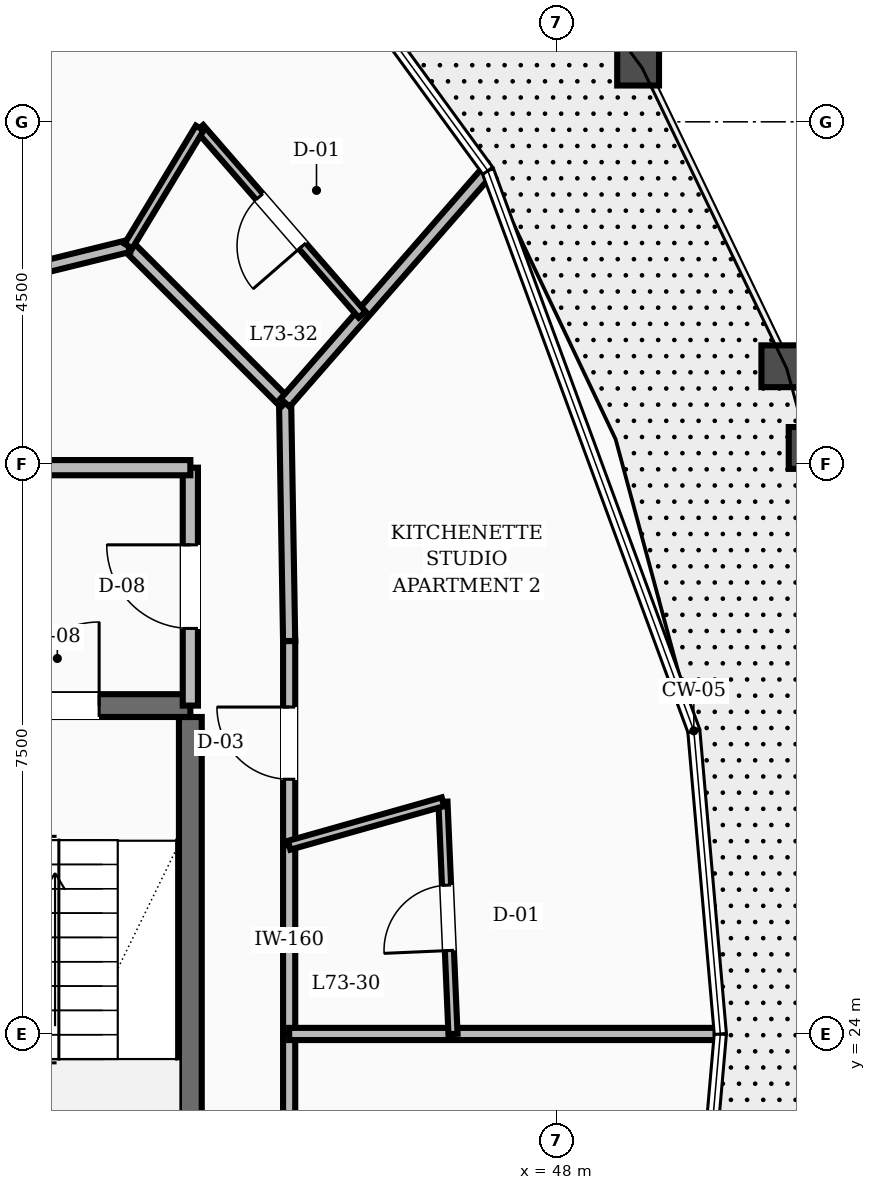
"""IFC4 building model, lengths in metres.
Left out: names, types, materials, properties, quantities, classifications, styles, units other than length and angle.
Written with IfcOpenShell. Run it as: python <this file> out.ifc"""

import sys

from ifc_helpers import new_model, si_unit, direction, frame, frame_2d, origin, place, context, subcontext, project, spatial, rectangle, extrude, element, fill, save


model = new_model("IFC4")
c1 = context("Model", 3, precision=1e-05, world=origin(), true_north=direction((0.0, 1.0)))
c2 = subcontext(c1, "Body", "Model", "MODEL_VIEW")
j1 = project(units=[si_unit("LENGTHUNIT", "METRE"), si_unit("PLANEANGLEUNIT", "RADIAN")], contexts=[c1])
p1 = place(None, origin())
s1 = spatial("IfcSite", under=j1, at=p1, CompositionType="ELEMENT")
p2 = place(p1, origin())
s2 = spatial("IfcBuilding", under=s1, at=p2, CompositionType="ELEMENT")
p3 = place(p2, frame((0.0, 0.0, 279.6)))
s3 = spatial("IfcBuildingStorey", under=s2, at=p3, CompositionType="ELEMENT", Elevation=279.6)
p4 = place(p3, frame((43.18, 19.43, 0.0), z_axis=(0.0, 0.0, 1.0), x_axis=(0.0, 1.0, 0.0)))
e1 = element("IfcWall", 1, at=p4, inside=s3, PredefinedType="SHEAR", context=c2, shape_type="SweptSolid", body=[
    extrude(rectangle(XDim=8.74, YDim=0.3, at=frame_2d((4.37, 0.0))), origin(), (0.0, 0.0, 1.0), 3.6),
])
p5 = place(p3, frame((39.58, 28.32, 0.0), z_axis=(0.0, 0.0, 1.0), x_axis=(1.0, 0.0, 0.0)))
e2 = element("IfcWall", 2, at=p5, inside=s3, PredefinedType="SHEAR", context=c2, shape_type="SweptSolid", body=[
    extrude(rectangle(XDim=3.6, YDim=0.3, at=frame_2d((1.8, 0.0))), origin(), (0.0, 0.0, 1.0), 3.6),
])
p6 = place(p5, frame((1.3, 0.0, 0.0)))
e3 = element("IfcOpeningElement", 3, at=p6, cuts=e2, PredefinedType="OPENING", context=c2, shape_type="SweptSolid", body=[
    extrude(rectangle(XDim=1.1, YDim=2.1, at=frame_2d((0.55, 1.05))), frame((0.0, 0.16, 0.0), z_axis=(0.0, -1.0, 0.0), x_axis=(1.0, 0.0, 0.0)), (0.0, 0.0, 1.0), 0.32),
])
p7 = place(p3, frame((43.18, 28.32, 0.0), z_axis=(0.0, 0.0, 1.0), x_axis=(0.0, 1.0, 0.0)))
e4 = element("IfcWall", 4, at=p7, inside=s3, PredefinedType="SOLIDWALL", context=c2, shape_type="SweptSolid", body=[
    extrude(rectangle(XDim=3.13, YDim=0.2, at=frame_2d((1.565, 0.0))), origin(), (0.0, 0.0, 1.0), 2.87),
])
p8 = place(p7, frame((1.015, 0.0, 0.0)))
e5 = element("IfcOpeningElement", 5, at=p8, cuts=e4, PredefinedType="OPENING", context=c2, shape_type="SweptSolid", body=[
    extrude(rectangle(XDim=1.1, YDim=2.1, at=frame_2d((0.55, 1.05))), frame((0.0, 0.11, 0.0), z_axis=(0.0, -1.0, 0.0), x_axis=(1.0, 0.0, 0.0)), (0.0, 0.0, 1.0), 0.22),
])
p9 = place(p3, frame((39.2, 31.45, 0.0), z_axis=(0.0, 0.0, 1.0), x_axis=(1.0, 0.0, 0.0)))
e6 = element("IfcWall", 6, at=p9, inside=s3, PredefinedType="SOLIDWALL", context=c2, shape_type="SweptSolid", body=[
    extrude(rectangle(XDim=3.98, YDim=0.2, at=frame_2d((1.99, 0.0))), origin(), (0.0, 0.0, 1.0), 2.87),
])
p10 = place(p3, frame((44.48, 24.0, 0.0), z_axis=(0.0, 0.0, 1.0), x_axis=(0.0, 1.0, 0.0)))
e7 = element("IfcWall", 7, at=p10, inside=s3, PredefinedType="SOLIDWALL", context=c2, shape_type="SweptSolid", body=[
    extrude(rectangle(XDim=2.482, YDim=0.16, at=frame_2d((1.241, 0.0))), origin(), (0.0, 0.0, 1.0), 2.87),
])
p11 = place(p3, frame((44.48, 26.482, 0.0), z_axis=(0.0, 0.0, 1.0), x_axis=(0.0, 1.0, 0.0)))
e8 = element("IfcWall", 8, at=p11, inside=s3, PredefinedType="SOLIDWALL", context=c2, shape_type="SweptSolid", body=[
    extrude(rectangle(XDim=2.687, YDim=0.16, at=frame_2d((1.344, 0.0))), origin(), (0.0, 0.0, 1.0), 2.87),
])
p12 = place(p11, frame((0.868, 0.0, 0.0)))
e9 = element("IfcOpeningElement", 9, at=p12, cuts=e8, PredefinedType="OPENING", context=c2, shape_type="SweptSolid", body=[
    extrude(rectangle(XDim=0.95, YDim=2.1, at=frame_2d((0.475, 1.05))), frame((0.0, 0.09, 0.0), z_axis=(0.0, -1.0, 0.0), x_axis=(1.0, 0.0, 0.0)), (0.0, 0.0, 1.0), 0.18),
])
p13 = place(p3, frame((44.48, 29.169, 0.0), z_axis=(0.0, 0.0, 1.0), x_axis=(-0.016981035134, 0.999855811828, 0.0)))
e10 = element("IfcWall", 10, at=p13, inside=s3, PredefinedType="SOLIDWALL", context=c2, shape_type="SweptSolid", body=[
    extrude(rectangle(XDim=3.134, YDim=0.16, at=frame_2d((1.567, 0.0))), origin(), (0.0, 0.0, 1.0), 2.87),
])
p14 = place(p3, frame((44.427, 32.303, 0.0), z_axis=(0.0, 0.0, 1.0), x_axis=(-0.707106781187, 0.707106781187, 0.0)))
e11 = element("IfcWall", 11, at=p14, inside=s3, PredefinedType="SOLIDWALL", context=c2, shape_type="SweptSolid", body=[
    extrude(rectangle(XDim=2.916, YDim=0.16, at=frame_2d((1.458, 0.0))), origin(), (0.0, 0.0, 1.0), 2.87),
])
p15 = place(p3, frame((42.365, 34.365, 0.0), z_axis=(0.0, 0.0, 1.0), x_axis=(-0.970939799552, -0.239323850978, 0.0)))
e12 = element("IfcWall", 12, at=p15, inside=s3, PredefinedType="SOLIDWALL", context=c2, shape_type="SweptSolid", body=[
    extrude(rectangle(XDim=4.241, YDim=0.16, at=frame_2d((2.12, 0.0))), origin(), (0.0, 0.0, 1.0), 2.87),
])
p16 = place(p15, frame((1.646, 0.0, 0.0)))
e13 = element("IfcOpeningElement", 13, at=p16, cuts=e12, PredefinedType="OPENING", context=c2, shape_type="SweptSolid", body=[
    extrude(rectangle(XDim=0.95, YDim=2.1, at=frame_2d((0.475, 1.05))), frame((0.0, 0.09, 0.0), z_axis=(0.0, -1.0, 0.0), x_axis=(1.0, 0.0, 0.0)), (0.0, 0.0, 1.0), 0.18),
])
p17 = place(p3, frame((44.48, 21.518, 0.0), z_axis=(0.0, 0.0, 1.0), x_axis=(0.0, 1.0, 0.0)))
e14 = element("IfcWall", 14, at=p17, inside=s3, PredefinedType="SOLIDWALL", context=c2, shape_type="SweptSolid", body=[
    extrude(rectangle(XDim=2.482, YDim=0.16, at=frame_2d((1.241, 0.0))), origin(), (0.0, 0.0, 1.0), 2.87),
])
p18 = place(p3, frame((44.48, 24.0, 0.0), z_axis=(0.0, 0.0, 1.0), x_axis=(1.0, 0.0, 0.0)))
e15 = element("IfcWall", 15, at=p18, inside=s3, PredefinedType="SOLIDWALL", context=c2, shape_type="SweptSolid", body=[
    extrude(rectangle(XDim=5.623, YDim=0.16, at=frame_2d((2.812, 0.0))), origin(), (0.0, 0.0, 1.0), 2.87),
])
p19 = place(p3, frame((46.635, 24.0, 0.0), z_axis=(0.0, 0.0, 1.0), x_axis=(-0.043281280957, 0.999062926306, 0.0)))
e16 = element("IfcWall", 16, at=p19, inside=s3, PredefinedType="PARTITIONING", context=c2, shape_type="SweptSolid", body=[
    extrude(rectangle(XDim=3.057, YDim=0.12, at=frame_2d((1.529, 0.0))), origin(), (0.0, 0.0, 1.0), 2.87),
])
p20 = place(p19, frame((1.099, 0.0, 0.0)))
e17 = element("IfcOpeningElement", 17, at=p20, cuts=e16, PredefinedType="OPENING", context=c2, shape_type="SweptSolid", body=[
    extrude(rectangle(XDim=0.86, YDim=2.1, at=frame_2d((0.43, 1.05))), frame((0.0, 0.07, 0.0), z_axis=(0.0, -1.0, 0.0), x_axis=(1.0, 0.0, 0.0)), (0.0, 0.0, 1.0), 0.14),
])
p21 = place(p3, frame((44.48, 26.482, 0.0), z_axis=(0.0, 0.0, 1.0), x_axis=(0.962278347066, 0.272066871869, 0.0)))
e18 = element("IfcWall", 18, at=p21, inside=s3, PredefinedType="PARTITIONING", context=c2, shape_type="SweptSolid", body=[
    extrude(rectangle(XDim=2.103, YDim=0.12, at=frame_2d((1.051, 0.0))), origin(), (0.0, 0.0, 1.0), 2.87),
])
p22 = place(p3, frame((44.427, 32.303, 0.0), z_axis=(0.0, 0.0, 1.0), x_axis=(0.657843835953, 0.753154358348, 0.0)))
e19 = element("IfcWall", 19, at=p22, inside=s3, PredefinedType="SOLIDWALL", context=c2, shape_type="SweptSolid", body=[
    extrude(rectangle(XDim=4.004, YDim=0.16, at=frame_2d((2.002, 0.0))), origin(), (0.0, 0.0, 1.0), 2.87),
])
p23 = place(p3, frame((45.44, 33.463, 0.0), z_axis=(0.0, 0.0, 1.0), x_axis=(-0.656340285245, 0.754464995851, 0.0)))
e20 = element("IfcWall", 20, at=p23, inside=s3, PredefinedType="PARTITIONING", context=c2, shape_type="SweptSolid", body=[
    extrude(rectangle(XDim=3.254, YDim=0.12, at=frame_2d((1.627, 0.0))), origin(), (0.0, 0.0, 1.0), 2.87),
])
p24 = place(p23, frame((1.197, 0.0, 0.0)))
e21 = element("IfcOpeningElement", 21, at=p24, cuts=e20, PredefinedType="OPENING", context=c2, shape_type="SweptSolid", body=[
    extrude(rectangle(XDim=0.86, YDim=2.1, at=frame_2d((0.43, 1.05))), frame((0.0, 0.07, 0.0), z_axis=(0.0, -1.0, 0.0), x_axis=(1.0, 0.0, 0.0)), (0.0, 0.0, 1.0), 0.14),
])
p25 = place(p3, frame((42.365, 34.365, 0.0), z_axis=(0.0, 0.0, 1.0), x_axis=(0.517222367242, 0.855851051775, 0.0)))
e22 = element("IfcWall", 22, at=p25, inside=s3, PredefinedType="PARTITIONING", context=c2, shape_type="SweptSolid", body=[
    extrude(rectangle(XDim=1.815, YDim=0.12, at=frame_2d((0.908, 0.0))), origin(), (0.0, 0.0, 1.0), 2.87),
])
p26 = place(p3, frame((38.248, 33.35, 0.0), z_axis=(0.0, 0.0, 1.0), x_axis=(0.455343199474, 0.890315994854, 0.0)))
e23 = element("IfcWall", 23, at=p26, inside=s3, PredefinedType="SOLIDWALL", context=c2, shape_type="SweptSolid", body=[
    extrude(rectangle(XDim=9.061, YDim=0.16, at=frame_2d((4.53, 0.0))), origin(), (0.0, 0.0, 1.0), 2.87),
])
p27 = place(p6, origin())
e24 = element("IfcDoor", 24, at=p27, inside=s3, OperationType="SINGLE_SWING_RIGHT", PredefinedType="DOOR", context=c2, shape_type="SweptSolid", body=[
    extrude(rectangle(XDim=1.1, YDim=2.1, at=frame_2d((0.55, 1.05))), frame((0.0, 0.025, 0.0), z_axis=(0.0, -1.0, 0.0), x_axis=(1.0, 0.0, 0.0)), (0.0, 0.0, 1.0), 0.05),
])
fill(e3, e24)
p28 = place(p8, origin())
e25 = element("IfcDoor", 25, at=p28, inside=s3, OperationType="SINGLE_SWING_RIGHT", PredefinedType="DOOR", context=c2, shape_type="SweptSolid", body=[
    extrude(rectangle(XDim=1.1, YDim=2.1, at=frame_2d((0.55, 1.05))), frame((0.0, 0.025, 0.0), z_axis=(0.0, -1.0, 0.0), x_axis=(1.0, 0.0, 0.0)), (0.0, 0.0, 1.0), 0.05),
])
fill(e5, e25)
p29 = place(p20, origin())
e26 = element("IfcDoor", 26, at=p29, inside=s3, OperationType="SINGLE_SWING_LEFT", PredefinedType="DOOR", context=c2, shape_type="SweptSolid", body=[
    extrude(rectangle(XDim=0.86, YDim=2.1, at=frame_2d((0.43, 1.05))), frame((0.0, 0.025, 0.0), z_axis=(0.0, -1.0, 0.0), x_axis=(1.0, 0.0, 0.0)), (0.0, 0.0, 1.0), 0.05),
])
fill(e17, e26)
p30 = place(p12, origin())
e27 = element("IfcDoor", 27, at=p30, inside=s3, OperationType="SINGLE_SWING_RIGHT", PredefinedType="DOOR", context=c2, shape_type="SweptSolid", body=[
    extrude(rectangle(XDim=0.95, YDim=2.1, at=frame_2d((0.475, 1.05))), frame((0.0, 0.025, 0.0), z_axis=(0.0, -1.0, 0.0), x_axis=(1.0, 0.0, 0.0)), (0.0, 0.0, 1.0), 0.05),
])
fill(e9, e27)
p31 = place(p24, origin())
e28 = element("IfcDoor", 28, at=p31, inside=s3, OperationType="SINGLE_SWING_LEFT", PredefinedType="DOOR", context=c2, shape_type="SweptSolid", body=[
    extrude(rectangle(XDim=0.86, YDim=2.1, at=frame_2d((0.43, 1.05))), frame((0.0, 0.025, 0.0), z_axis=(0.0, -1.0, 0.0), x_axis=(1.0, 0.0, 0.0)), (0.0, 0.0, 1.0), 0.05),
])
fill(e21, e28)
save(model, sys.argv[1])
